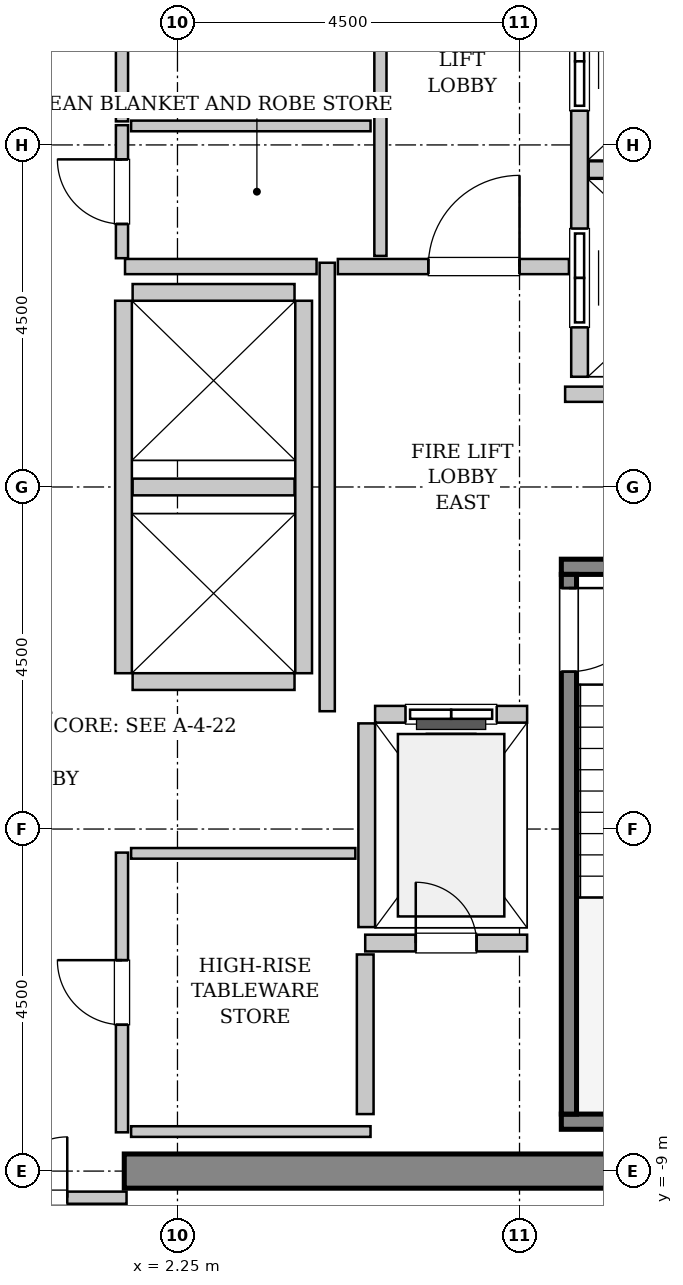
"""IFC4 building model, lengths in metres.
Left out: names, types, materials, properties, quantities, classifications, styles, units other than length and angle.
Written with IfcOpenShell. Run it as: python <this file> out.ifc"""

import sys

from ifc_helpers import new_model, si_unit, direction, frame, frame_2d, origin, place, context, subcontext, project, spatial, rectangle, extrude, source, transform, mapped, element, fill, save


model = new_model("IFC4")
c1 = context("Model", 3, precision=1e-05, world=origin(), true_north=direction((0.0, 1.0)))
c2 = subcontext(c1, "Body", "Model", "MODEL_VIEW")
j1 = project(units=[si_unit("LENGTHUNIT", "METRE"), si_unit("PLANEANGLEUNIT", "RADIAN")], contexts=[c1])
p1 = place(None, origin())
s1 = spatial("IfcSite", under=j1, at=p1, CompositionType="ELEMENT")
p2 = place(p1, origin())
s2 = spatial("IfcBuilding", under=s1, at=p2, CompositionType="ELEMENT")
p3 = place(p2, frame((0.0, 0.0, 310.2)))
s3 = spatial("IfcBuildingStorey", under=s2, at=p3, CompositionType="ELEMENT", Elevation=310.2)
m1 = source(origin(), c2, "Body", "SweptSolid", [
    extrude(rectangle(XDim=9.925, YDim=0.45, at=frame_2d((4.962, 0.0))), origin(), (0.0, 0.0, 1.0), 3.8),
])
p4 = place(p3, frame((1.55, -9.0, 0.0), z_axis=(0.0, 0.0, 1.0), x_axis=(1.0, 0.0, 0.0)))
e1 = element("IfcWall", 1, at=p4, inside=s3, PredefinedType="SHEAR", context=c2, shape_type="MappedRepresentation", body=[
    mapped(m1, transform((0.0, 0.0, 0.0), x_axis=(1.0, 0.0, 0.0), y_axis=(0.0, 1.0, 0.0), z_axis=(0.0, 0.0, 1.0), scale=1.0)),
])
m2 = source(origin(), c2, "Body", "SweptSolid", [
    extrude(rectangle(XDim=3.4, YDim=0.2, at=frame_2d((1.7, 0.0))), origin(), (0.0, 0.0, 1.0), 3.8),
])
p5 = place(p3, frame((7.3, -1.05, 0.0), z_axis=(0.0, 0.0, 1.0), x_axis=(1.0, 0.0, 0.0)))
e2 = element("IfcWall", 2, at=p5, inside=s3, PredefinedType="SOLIDWALL", context=c2, shape_type="MappedRepresentation", body=[
    mapped(m2, transform((0.0, 0.0, 0.0), x_axis=(1.0, 0.0, 0.0), y_axis=(0.0, 1.0, 0.0), z_axis=(0.0, 0.0, 1.0), scale=1.0)),
])
m3 = source(origin(), c2, "Body", "SweptSolid", [
    extrude(rectangle(XDim=3.73, YDim=0.2, at=frame_2d((1.865, 0.0))), origin(), (0.0, 0.0, 1.0), 3.8),
])
p6 = place(p3, frame((7.3, -8.35, 0.0), z_axis=(0.0, 0.0, 1.0), x_axis=(1.0, 0.0, 0.0)))
e3 = element("IfcWall", 3, at=p6, inside=s3, PredefinedType="SOLIDWALL", context=c2, shape_type="MappedRepresentation", body=[
    mapped(m3, transform((0.0, 0.0, 0.0), x_axis=(1.0, 0.0, 0.0), y_axis=(0.0, 1.0, 0.0), z_axis=(0.0, 0.0, 1.0), scale=1.0)),
])
m4 = source(origin(), c2, "Body", "SweptSolid", [
    extrude(rectangle(XDim=7.1, YDim=0.2, at=frame_2d((3.55, 0.0))), origin(), (0.0, 0.0, 1.0), 3.8),
])
p7 = place(p3, frame((7.4, -1.15, 0.0), z_axis=(0.0, 0.0, 1.0), x_axis=(0.0, -1.0, 0.0)))
e4 = element("IfcWall", 4, at=p7, inside=s3, PredefinedType="SOLIDWALL", context=c2, shape_type="MappedRepresentation", body=[
    mapped(m4, transform((0.0, 0.0, 0.0), x_axis=(1.0, 0.0, 0.0), y_axis=(0.0, 1.0, 0.0), z_axis=(0.0, 0.0, 1.0), scale=1.0)),
])
p8 = place(p7, frame((0.18, 0.0, 0.0)))
e5 = element("IfcOpeningElement", 5, at=p8, cuts=e4, PredefinedType="OPENING", context=c2, shape_type="SweptSolid", body=[
    extrude(rectangle(XDim=1.1, YDim=2.15, at=frame_2d((0.55, 1.075))), frame((0.0, 0.11, 0.0), z_axis=(0.0, -1.0, 0.0), x_axis=(1.0, 0.0, 0.0)), (0.0, 0.0, 1.0), 0.22),
])
m5 = source(origin(), c2, "Body", "SweptSolid", [
    extrude(rectangle(XDim=2.0, YDim=0.22, at=frame_2d((1.0, 0.0))), origin(), (0.0, 0.0, 1.0), 3.535),
])
p9 = place(p3, frame((6.85, -2.99, 0.0), z_axis=(0.0, 0.0, 1.0), x_axis=(-1.0, 0.0, 0.0)))
e6 = element("IfcWall", 6, at=p9, inside=s3, PredefinedType="SOLIDWALL", context=c2, shape_type="MappedRepresentation", body=[
    mapped(m5, transform((0.0, 0.0, 0.0), x_axis=(1.0, 0.0, 0.0), y_axis=(0.0, 1.0, 0.0), z_axis=(0.0, 0.0, 1.0), scale=1.0)),
])
p10 = place(p9, frame((0.4, 0.0, 0.0)))
e7 = element("IfcOpeningElement", 7, at=p10, cuts=e6, PredefinedType="OPENING", context=c2, shape_type="SweptSolid", body=[
    extrude(rectangle(XDim=1.2, YDim=2.2, at=frame_2d((0.6, 1.1))), frame((0.0, 0.12, 0.0), z_axis=(0.0, -1.0, 0.0), x_axis=(1.0, 0.0, 0.0)), (0.0, 0.0, 1.0), 0.24),
])
m6 = source(origin(), c2, "Body", "SweptSolid", [
    extrude(rectangle(XDim=2.68, YDim=0.22, at=frame_2d((1.34, 0.0))), origin(), (0.0, 0.0, 1.0), 3.535),
])
p11 = place(p3, frame((4.74, -3.11, 0.0), z_axis=(0.0, 0.0, 1.0), x_axis=(0.0, -1.0, 0.0)))
e8 = element("IfcWall", 8, at=p11, inside=s3, PredefinedType="SOLIDWALL", context=c2, shape_type="MappedRepresentation", body=[
    mapped(m6, transform((0.0, 0.0, 0.0), x_axis=(1.0, 0.0, 0.0), y_axis=(0.0, 1.0, 0.0), z_axis=(0.0, 0.0, 1.0), scale=1.0)),
])
m7 = source(origin(), c2, "Body", "SweptSolid", [
    extrude(rectangle(XDim=5.45, YDim=0.22, at=frame_2d((2.725, 0.0))), origin(), (0.0, 0.0, 1.0), 3.535),
])
p12 = place(p3, frame((7.54, 6.9, 0.0), z_axis=(0.0, 0.0, 1.0), x_axis=(0.0, -1.0, 0.0)))
e9 = element("IfcWall", 9, at=p12, inside=s3, PredefinedType="SOLIDWALL", context=c2, shape_type="MappedRepresentation", body=[
    mapped(m7, transform((0.0, 0.0, 0.0), x_axis=(1.0, 0.0, 0.0), y_axis=(0.0, 1.0, 0.0), z_axis=(0.0, 0.0, 1.0), scale=1.0)),
])
p13 = place(p12, frame((3.5, 0.0, 0.0)))
e10 = element("IfcOpeningElement", 10, at=p13, cuts=e9, PredefinedType="OPENING", context=c2, shape_type="SweptSolid", body=[
    extrude(rectangle(XDim=1.3, YDim=2.3, at=frame_2d((0.65, 1.15))), frame((0.0, 0.12, 0.0), z_axis=(0.0, -1.0, 0.0), x_axis=(1.0, 0.0, 0.0)), (0.0, 0.0, 1.0), 0.24),
])
p14 = place(p12, frame((0.65, 0.0, 0.0)))
e11 = element("IfcOpeningElement", 11, at=p14, cuts=e9, PredefinedType="OPENING", context=c2, shape_type="SweptSolid", body=[
    extrude(rectangle(XDim=1.3, YDim=2.3, at=frame_2d((0.65, 1.15))), frame((0.0, 0.12, 0.0), z_axis=(0.0, -1.0, 0.0), x_axis=(1.0, 0.0, 0.0)), (0.0, 0.0, 1.0), 0.24),
])
m8 = source(origin(), c2, "Body", "SweptSolid", [
    extrude(rectangle(XDim=2.78, YDim=0.22, at=frame_2d((1.39, 0.0))), origin(), (0.0, 0.0, 1.0), 3.535),
])
p15 = place(p3, frame((7.66, 4.175, 0.0), z_axis=(0.0, 0.0, 1.0), x_axis=(1.0, 0.0, 0.0)))
e12 = element("IfcWall", 12, at=p15, inside=s3, PredefinedType="SOLIDWALL", context=c2, shape_type="MappedRepresentation", body=[
    mapped(m8, transform((0.0, 0.0, 0.0), x_axis=(1.0, 0.0, 0.0), y_axis=(0.0, 1.0, 0.0), z_axis=(0.0, 0.0, 1.0), scale=1.0)),
])
m9 = source(origin(), c2, "Body", "SweptSolid", [
    extrude(rectangle(XDim=4.9, YDim=0.22, at=frame_2d((2.45, 0.0))), origin(), (0.0, 0.0, 1.0), 3.535),
])
for number, where, z_axis, x_axis in (
    (13, (1.54, 2.45, 0.0), (0.0, 0.0, 1.0), (0.0, -1.0, 0.0)),
    (14, (3.91, -2.45, 0.0), (0.0, 0.0, 1.0), (0.0, 1.0, 0.0)),
):
    element("IfcWall", number, at=place(p3, frame(where, z_axis=z_axis, x_axis=x_axis)), inside=s3, PredefinedType="SOLIDWALL", context=c2, shape_type="MappedRepresentation", body=[
        mapped(m9, transform((0.0, 0.0, 0.0), x_axis=(1.0, 0.0, 0.0), y_axis=(0.0, 1.0, 0.0), z_axis=(0.0, 0.0, 1.0), scale=1.0)),
    ])
m10 = source(origin(), c2, "Body", "SweptSolid", [
    extrude(rectangle(XDim=2.13, YDim=0.22, at=frame_2d((1.065, 0.0))), origin(), (0.0, 0.0, 1.0), 3.535),
])
for number, where, z_axis, x_axis in (
    (15, (1.66, -2.56, 0.0), (0.0, 0.0, 1.0), (1.0, 0.0, 0.0)),
    (16, (1.66, 0.0, 0.0), (0.0, 0.0, 1.0), (1.0, 0.0, 0.0)),
    (17, (3.79, 2.56, 0.0), (0.0, 0.0, 1.0), (-1.0, 0.0, 0.0)),
):
    element("IfcWall", number, at=place(p3, frame(where, z_axis=z_axis, x_axis=x_axis)), inside=s3, PredefinedType="SOLIDWALL", context=c2, shape_type="MappedRepresentation", body=[
        mapped(m10, transform((0.0, 0.0, 0.0), x_axis=(1.0, 0.0, 0.0), y_axis=(0.0, 1.0, 0.0), z_axis=(0.0, 0.0, 1.0), scale=1.0)),
    ])
p16 = place(p3, frame((4.72, -6.0, 0.0), z_axis=(0.0, 0.0, 1.0), x_axis=(1.0, 0.0, 0.0)))
e18 = element("IfcWall", 18, at=p16, inside=s3, PredefinedType="SOLIDWALL", context=c2, shape_type="MappedRepresentation", body=[
    mapped(m10, transform((0.0, 0.0, 0.0), x_axis=(1.0, 0.0, 0.0), y_axis=(0.0, 1.0, 0.0), z_axis=(0.0, 0.0, 1.0), scale=1.0)),
])
p17 = place(p16, frame((0.665, 0.0, 0.0)))
e19 = element("IfcOpeningElement", 19, at=p17, cuts=e18, PredefinedType="OPENING", context=c2, shape_type="SweptSolid", body=[
    extrude(rectangle(XDim=0.8, YDim=2.0, at=frame_2d((0.4, 1.0))), frame((0.0, 0.12, 0.0), z_axis=(0.0, -1.0, 0.0), x_axis=(1.0, 0.0, 0.0)), (0.0, 0.0, 1.0), 0.24),
])
m11 = source(origin(), c2, "Body", "SweptSolid", [
    extrude(rectangle(XDim=2.1, YDim=0.22, at=frame_2d((1.05, 0.0))), origin(), (0.0, 0.0, 1.0), 3.535),
])
p18 = place(p3, frame((4.72, -8.25, 0.0), z_axis=(0.0, 0.0, 1.0), x_axis=(0.0, 1.0, 0.0)))
e20 = element("IfcWall", 20, at=p18, inside=s3, PredefinedType="SOLIDWALL", context=c2, shape_type="MappedRepresentation", body=[
    mapped(m11, transform((0.0, 0.0, 0.0), x_axis=(1.0, 0.0, 0.0), y_axis=(0.0, 1.0, 0.0), z_axis=(0.0, 0.0, 1.0), scale=1.0)),
])
m12 = source(origin(), c2, "Body", "SweptSolid", [
    extrude(rectangle(XDim=5.9, YDim=0.2, at=frame_2d((2.95, 0.0))), origin(), (0.0, 0.0, 1.0), 3.535),
])
p19 = place(p3, frame((4.22, -2.95, 0.0), z_axis=(0.0, 0.0, 1.0), x_axis=(0.0, 1.0, 0.0)))
e21 = element("IfcWall", 21, at=p19, inside=s3, PredefinedType="PARTITIONING", context=c2, shape_type="MappedRepresentation", body=[
    mapped(m12, transform((0.0, 0.0, 0.0), x_axis=(1.0, 0.0, 0.0), y_axis=(0.0, 1.0, 0.0), z_axis=(0.0, 0.0, 1.0), scale=1.0)),
])
m13 = source(origin(), c2, "Body", "SweptSolid", [
    extrude(rectangle(XDim=2.52, YDim=0.2, at=frame_2d((1.26, 0.0))), origin(), (0.0, 0.0, 1.0), 3.535),
])
p20 = place(p3, frame((1.56, 2.9, 0.0), z_axis=(0.0, 0.0, 1.0), x_axis=(1.0, 0.0, 0.0)))
e22 = element("IfcWall", 22, at=p20, inside=s3, PredefinedType="PARTITIONING", context=c2, shape_type="MappedRepresentation", body=[
    mapped(m13, transform((0.0, 0.0, 0.0), x_axis=(1.0, 0.0, 0.0), y_axis=(0.0, 1.0, 0.0), z_axis=(0.0, 0.0, 1.0), scale=1.0)),
])
m14 = source(origin(), c2, "Body", "SweptSolid", [
    extrude(rectangle(XDim=3.04, YDim=0.2, at=frame_2d((1.52, 0.0))), origin(), (0.0, 0.0, 1.0), 3.535),
])
p21 = place(p3, frame((4.36, 2.9, 0.0), z_axis=(0.0, 0.0, 1.0), x_axis=(1.0, 0.0, 0.0)))
e23 = element("IfcWall", 23, at=p21, inside=s3, PredefinedType="PARTITIONING", context=c2, shape_type="MappedRepresentation", body=[
    mapped(m14, transform((0.0, 0.0, 0.0), x_axis=(1.0, 0.0, 0.0), y_axis=(0.0, 1.0, 0.0), z_axis=(0.0, 0.0, 1.0), scale=1.0)),
])
p22 = place(p21, frame((1.19, 0.0, 0.0)))
e24 = element("IfcOpeningElement", 24, at=p22, cuts=e23, PredefinedType="OPENING", context=c2, shape_type="SweptSolid", body=[
    extrude(rectangle(XDim=1.2, YDim=2.15, at=frame_2d((0.6, 1.075))), frame((0.0, 0.11, 0.0), z_axis=(0.0, -1.0, 0.0), x_axis=(1.0, 0.0, 0.0)), (0.0, 0.0, 1.0), 0.22),
])
m15 = source(origin(), c2, "Body", "SweptSolid", [
    extrude(rectangle(XDim=4.11, YDim=0.2, at=frame_2d((2.055, 0.0))), origin(), (0.0, 0.0, 1.0), 3.535),
])
p23 = place(p3, frame((7.35, 1.22, 0.0), z_axis=(0.0, 0.0, 1.0), x_axis=(1.0, 0.0, 0.0)))
e25 = element("IfcWall", 25, at=p23, inside=s3, PredefinedType="PARTITIONING", context=c2, shape_type="MappedRepresentation", body=[
    mapped(m15, transform((0.0, 0.0, 0.0), x_axis=(1.0, 0.0, 0.0), y_axis=(0.0, 1.0, 0.0), z_axis=(0.0, 0.0, 1.0), scale=1.0)),
])
m16 = source(origin(), c2, "Body", "SweptSolid", [
    extrude(rectangle(XDim=3.16, YDim=0.16, at=frame_2d((1.58, 0.0))), origin(), (0.0, 0.0, 1.0), 2.625),
])
p24 = place(p3, frame((-1.58, -9.35, 0.0), z_axis=(0.0, 0.0, 1.0), x_axis=(1.0, 0.0, 0.0)))
e26 = element("IfcWall", 26, at=p24, inside=s3, PredefinedType="PARTITIONING", context=c2, shape_type="MappedRepresentation", body=[
    mapped(m16, transform((0.0, 0.0, 0.0), x_axis=(1.0, 0.0, 0.0), y_axis=(0.0, 1.0, 0.0), z_axis=(0.0, 0.0, 1.0), scale=1.0)),
])
p25 = place(p24, frame((0.78, 0.0, 0.0)))
e27 = element("IfcOpeningElement", 27, at=p25, cuts=e26, PredefinedType="OPENING", context=c2, shape_type="SweptSolid", body=[
    extrude(rectangle(XDim=1.6, YDim=2.3, at=frame_2d((0.8, 1.15))), frame((0.0, 0.09, 0.0), z_axis=(0.0, -1.0, 0.0), x_axis=(1.0, 0.0, 0.0)), (0.0, 0.0, 1.0), 0.18),
])
m17 = source(origin(), c2, "Body", "SweptSolid", [
    extrude(rectangle(XDim=5.45, YDim=0.16, at=frame_2d((2.725, 0.0))), origin(), (0.0, 0.0, 1.0), 3.535),
])
p26 = place(p3, frame((4.92, 3.04, 0.0), z_axis=(0.0, 0.0, 1.0), x_axis=(0.0, 1.0, 0.0)))
e28 = element("IfcWall", 28, at=p26, inside=s3, PredefinedType="PARTITIONING", context=c2, shape_type="MappedRepresentation", body=[
    mapped(m17, transform((0.0, 0.0, 0.0), x_axis=(1.0, 0.0, 0.0), y_axis=(0.0, 1.0, 0.0), z_axis=(0.0, 0.0, 1.0), scale=1.0)),
])
m18 = source(origin(), c2, "Body", "SweptSolid", [
    extrude(rectangle(XDim=1.75, YDim=0.16, at=frame_2d((0.875, 0.0))), origin(), (0.0, 0.0, 1.0), 3.535),
])
p27 = place(p3, frame((1.52, 3.01, 0.0), z_axis=(0.0, 0.0, 1.0), x_axis=(0.0, 1.0, 0.0)))
e29 = element("IfcWall", 29, at=p27, inside=s3, PredefinedType="PARTITIONING", context=c2, shape_type="MappedRepresentation", body=[
    mapped(m18, transform((0.0, 0.0, 0.0), x_axis=(1.0, 0.0, 0.0), y_axis=(0.0, 1.0, 0.0), z_axis=(0.0, 0.0, 1.0), scale=1.0)),
])
p28 = place(p27, frame((0.45, 0.0, 0.0)))
e30 = element("IfcOpeningElement", 30, at=p28, cuts=e29, PredefinedType="OPENING", context=c2, shape_type="SweptSolid", body=[
    extrude(rectangle(XDim=0.85, YDim=2.1, at=frame_2d((0.425, 1.05))), frame((0.0, 0.09, 0.0), z_axis=(0.0, -1.0, 0.0), x_axis=(1.0, 0.0, 0.0)), (0.0, 0.0, 1.0), 0.18),
])
m19 = source(origin(), c2, "Body", "SweptSolid", [
    extrude(rectangle(XDim=3.15, YDim=0.14, at=frame_2d((1.575, 0.0))), origin(), (0.0, 0.0, 1.0), 3.535),
])
p29 = place(p3, frame((1.64, 4.75, 0.0), z_axis=(0.0, 0.0, 1.0), x_axis=(1.0, 0.0, 0.0)))
e31 = element("IfcWall", 31, at=p29, inside=s3, PredefinedType="PARTITIONING", context=c2, shape_type="MappedRepresentation", body=[
    mapped(m19, transform((0.0, 0.0, 0.0), x_axis=(1.0, 0.0, 0.0), y_axis=(0.0, 1.0, 0.0), z_axis=(0.0, 0.0, 1.0), scale=1.0)),
])
m20 = source(origin(), c2, "Body", "SweptSolid", [
    extrude(rectangle(XDim=3.68, YDim=0.16, at=frame_2d((1.84, 0.0))), origin(), (0.0, 0.0, 1.0), 3.535),
])
p30 = place(p3, frame((1.52, 4.81, 0.0), z_axis=(0.0, 0.0, 1.0), x_axis=(0.0, 1.0, 0.0)))
e32 = element("IfcWall", 32, at=p30, inside=s3, PredefinedType="PARTITIONING", context=c2, shape_type="MappedRepresentation", body=[
    mapped(m20, transform((0.0, 0.0, 0.0), x_axis=(1.0, 0.0, 0.0), y_axis=(0.0, 1.0, 0.0), z_axis=(0.0, 0.0, 1.0), scale=1.0)),
])
p31 = place(p30, frame((1.415, 0.0, 0.0)))
e33 = element("IfcOpeningElement", 33, at=p31, cuts=e32, PredefinedType="OPENING", context=c2, shape_type="SweptSolid", body=[
    extrude(rectangle(XDim=0.85, YDim=2.1, at=frame_2d((0.425, 1.05))), frame((0.0, 0.09, 0.0), z_axis=(0.0, -1.0, 0.0), x_axis=(1.0, 0.0, 0.0)), (0.0, 0.0, 1.0), 0.18),
])
p32 = place(p3, frame((1.52, -8.49, 0.0), z_axis=(0.0, 0.0, 1.0), x_axis=(0.0, 1.0, 0.0)))
e34 = element("IfcWall", 34, at=p32, inside=s3, PredefinedType="PARTITIONING", context=c2, shape_type="MappedRepresentation", body=[
    mapped(m20, transform((0.0, 0.0, 0.0), x_axis=(1.0, 0.0, 0.0), y_axis=(0.0, 1.0, 0.0), z_axis=(0.0, 0.0, 1.0), scale=1.0)),
])
p33 = place(p32, frame((1.415, 0.0, 0.0)))
e35 = element("IfcOpeningElement", 35, at=p33, cuts=e34, PredefinedType="OPENING", context=c2, shape_type="SweptSolid", body=[
    extrude(rectangle(XDim=0.85, YDim=2.1, at=frame_2d((0.425, 1.05))), frame((0.0, 0.09, 0.0), z_axis=(0.0, -1.0, 0.0), x_axis=(1.0, 0.0, 0.0)), (0.0, 0.0, 1.0), 0.18),
])
m21 = source(origin(), c2, "Body", "SweptSolid", [
    extrude(rectangle(XDim=2.95, YDim=0.14, at=frame_2d((1.475, 0.0))), origin(), (0.0, 0.0, 1.0), 3.535),
])
p34 = place(p3, frame((1.64, -4.82, 0.0), z_axis=(0.0, 0.0, 1.0), x_axis=(1.0, 0.0, 0.0)))
e36 = element("IfcWall", 36, at=p34, inside=s3, PredefinedType="PARTITIONING", context=c2, shape_type="MappedRepresentation", body=[
    mapped(m21, transform((0.0, 0.0, 0.0), x_axis=(1.0, 0.0, 0.0), y_axis=(0.0, 1.0, 0.0), z_axis=(0.0, 0.0, 1.0), scale=1.0)),
])
p35 = place(p3, frame((1.64, -8.48, 0.0), z_axis=(0.0, 0.0, 1.0), x_axis=(1.0, 0.0, 0.0)))
e37 = element("IfcWall", 37, at=p35, inside=s3, PredefinedType="PARTITIONING", context=c2, shape_type="MappedRepresentation", body=[
    mapped(m19, transform((0.0, 0.0, 0.0), x_axis=(1.0, 0.0, 0.0), y_axis=(0.0, 1.0, 0.0), z_axis=(0.0, 0.0, 1.0), scale=1.0)),
])
m22 = source(origin(), c2, "Body", "SweptSolid", [
    extrude(rectangle(XDim=1.1, YDim=2.15, at=frame_2d((0.55, 1.075))), frame((0.0, 0.025, 0.0), z_axis=(0.0, -1.0, 0.0), x_axis=(1.0, 0.0, 0.0)), (0.0, 0.0, 1.0), 0.05),
])
p36 = place(p8, origin())
e38 = element("IfcDoor", 38, at=p36, inside=s3, OperationType="SINGLE_SWING_LEFT", PredefinedType="DOOR", context=c2, shape_type="MappedRepresentation", body=[
    mapped(m22, transform((0.0, 0.0, 0.0), x_axis=(1.0, 0.0, 0.0), y_axis=(0.0, 1.0, 0.0), z_axis=(0.0, 0.0, 1.0), scale=1.0)),
])
fill(e5, e38)
m23 = source(origin(), c2, "Body", "SweptSolid", [
    extrude(rectangle(XDim=1.2, YDim=2.2, at=frame_2d((0.6, 1.1))), frame((0.0, 0.025, 0.0), z_axis=(0.0, -1.0, 0.0), x_axis=(1.0, 0.0, 0.0)), (0.0, 0.0, 1.0), 0.05),
])
p37 = place(p10, origin())
e39 = element("IfcDoor", 39, at=p37, inside=s3, OperationType="SLIDING_TO_LEFT", PredefinedType="DOOR", context=c2, shape_type="MappedRepresentation", body=[
    mapped(m23, transform((0.0, 0.0, 0.0), x_axis=(1.0, 0.0, 0.0), y_axis=(0.0, 1.0, 0.0), z_axis=(0.0, 0.0, 1.0), scale=1.0)),
])
fill(e7, e39)
m24 = source(origin(), c2, "Body", "SweptSolid", [
    extrude(rectangle(XDim=1.3, YDim=2.3, at=frame_2d((0.65, 1.15))), frame((0.0, 0.025, 0.0), z_axis=(0.0, -1.0, 0.0), x_axis=(1.0, 0.0, 0.0)), (0.0, 0.0, 1.0), 0.05),
])
p38 = place(p13, origin())
e40 = element("IfcDoor", 40, at=p38, inside=s3, OperationType="SLIDING_TO_RIGHT", PredefinedType="DOOR", context=c2, shape_type="MappedRepresentation", body=[
    mapped(m24, transform((0.0, 0.0, 0.0), x_axis=(1.0, 0.0, 0.0), y_axis=(0.0, 1.0, 0.0), z_axis=(0.0, 0.0, 1.0), scale=1.0)),
])
fill(e10, e40)
p39 = place(p14, origin())
e41 = element("IfcDoor", 41, at=p39, inside=s3, OperationType="SLIDING_TO_RIGHT", PredefinedType="DOOR", context=c2, shape_type="MappedRepresentation", body=[
    mapped(m24, transform((0.0, 0.0, 0.0), x_axis=(1.0, 0.0, 0.0), y_axis=(0.0, 1.0, 0.0), z_axis=(0.0, 0.0, 1.0), scale=1.0)),
])
fill(e11, e41)
m25 = source(origin(), c2, "Body", "SweptSolid", [
    extrude(rectangle(XDim=0.8, YDim=2.0, at=frame_2d((0.4, 1.0))), frame((0.0, 0.025, 0.0), z_axis=(0.0, -1.0, 0.0), x_axis=(1.0, 0.0, 0.0)), (0.0, 0.0, 1.0), 0.05),
])
p40 = place(p17, origin())
e42 = element("IfcDoor", 42, at=p40, inside=s3, OperationType="SINGLE_SWING_LEFT", PredefinedType="TRAPDOOR", context=c2, shape_type="MappedRepresentation", body=[
    mapped(m25, transform((0.0, 0.0, 0.0), x_axis=(1.0, 0.0, 0.0), y_axis=(0.0, 1.0, 0.0), z_axis=(0.0, 0.0, 1.0), scale=1.0)),
])
fill(e19, e42)
m26 = source(origin(), c2, "Body", "SweptSolid", [
    extrude(rectangle(XDim=1.2, YDim=2.15, at=frame_2d((0.6, 1.075))), frame((0.0, 0.025, 0.0), z_axis=(0.0, -1.0, 0.0), x_axis=(1.0, 0.0, 0.0)), (0.0, 0.0, 1.0), 0.05),
])
p41 = place(p22, origin())
e43 = element("IfcDoor", 43, at=p41, inside=s3, OperationType="SINGLE_SWING_RIGHT", PredefinedType="DOOR", context=c2, shape_type="MappedRepresentation", body=[
    mapped(m26, transform((0.0, 0.0, 0.0), x_axis=(1.0, 0.0, 0.0), y_axis=(0.0, 1.0, 0.0), z_axis=(0.0, 0.0, 1.0), scale=1.0)),
])
fill(e24, e43)
m27 = source(origin(), c2, "Body", "SweptSolid", [
    extrude(rectangle(XDim=1.6, YDim=2.3, at=frame_2d((0.8, 1.15))), frame((0.0, 0.025, 0.0), z_axis=(0.0, -1.0, 0.0), x_axis=(1.0, 0.0, 0.0)), (0.0, 0.0, 1.0), 0.05),
])
p42 = place(p25, origin())
e44 = element("IfcDoor", 44, at=p42, inside=s3, OperationType="DOUBLE_DOOR_SINGLE_SWING", PredefinedType="DOOR", context=c2, shape_type="MappedRepresentation", body=[
    mapped(m27, transform((0.0, 0.0, 0.0), x_axis=(1.0, 0.0, 0.0), y_axis=(0.0, 1.0, 0.0), z_axis=(0.0, 0.0, 1.0), scale=1.0)),
])
fill(e27, e44)
m28 = source(origin(), c2, "Body", "SweptSolid", [
    extrude(rectangle(XDim=0.85, YDim=2.1, at=frame_2d((0.425, 1.05))), frame((0.0, 0.025, 0.0), z_axis=(0.0, -1.0, 0.0), x_axis=(1.0, 0.0, 0.0)), (0.0, 0.0, 1.0), 0.05),
])
p43 = place(p28, origin())
e45 = element("IfcDoor", 45, at=p43, inside=s3, OperationType="SINGLE_SWING_RIGHT", PredefinedType="DOOR", context=c2, shape_type="MappedRepresentation", body=[
    mapped(m28, transform((0.0, 0.0, 0.0), x_axis=(1.0, 0.0, 0.0), y_axis=(0.0, 1.0, 0.0), z_axis=(0.0, 0.0, 1.0), scale=1.0)),
])
fill(e30, e45)
p44 = place(p33, origin())
e46 = element("IfcDoor", 46, at=p44, inside=s3, OperationType="SINGLE_SWING_RIGHT", PredefinedType="DOOR", context=c2, shape_type="MappedRepresentation", body=[
    mapped(m28, transform((0.0, 0.0, 0.0), x_axis=(1.0, 0.0, 0.0), y_axis=(0.0, 1.0, 0.0), z_axis=(0.0, 0.0, 1.0), scale=1.0)),
])
fill(e35, e46)
save(model, sys.argv[1])
